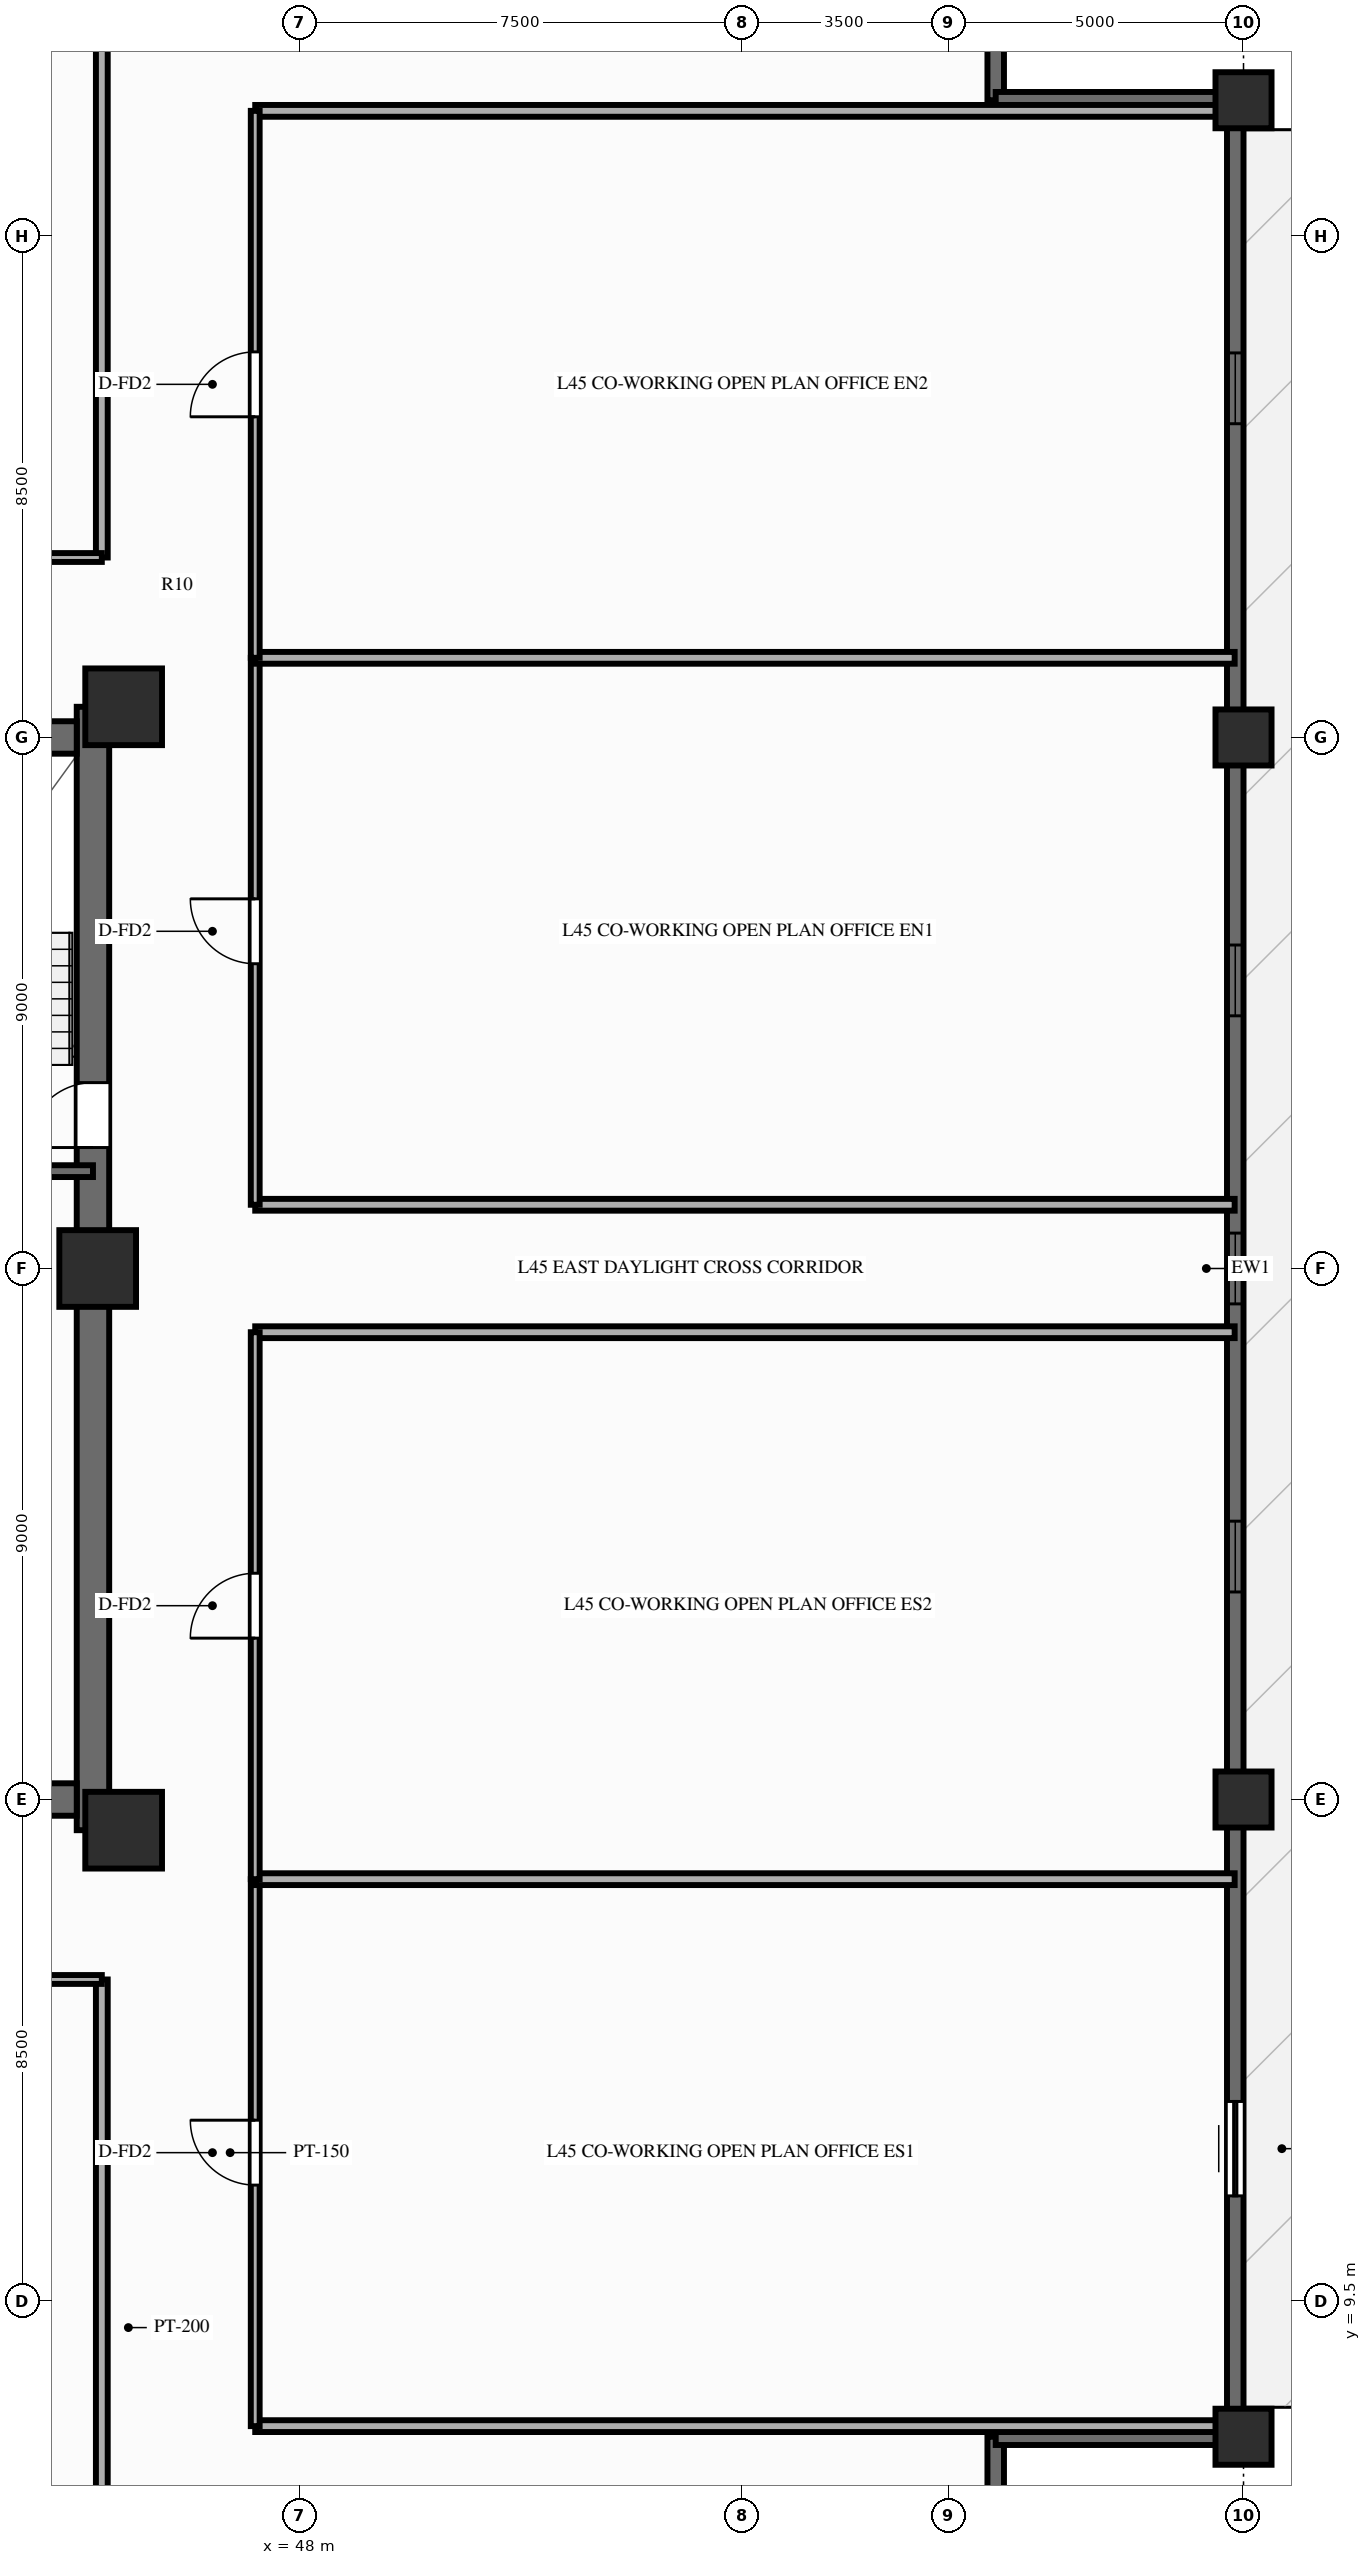
"""IFC4 building model, lengths in metres.
Left out: names, types, materials, properties, quantities, classifications, styles, units other than length and angle.
Written with IfcOpenShell. Run it as: python <this file> out.ifc"""

import sys

from ifc_helpers import new_model, si_unit, direction, frame, frame_2d, origin, origin_2d, place, context, subcontext, project, spatial, rectangle, extrude, source, transform, mapped, element, fill, save


model = new_model("IFC4")
c1 = context("Model", 3, precision=1e-05, world=origin(), true_north=direction((0.0, 1.0)))
c2 = subcontext(c1, "Body", "Model", "MODEL_VIEW")
j1 = project(units=[si_unit("LENGTHUNIT", "METRE"), si_unit("PLANEANGLEUNIT", "RADIAN")], contexts=[c1])
p1 = place(None, origin())
s1 = spatial("IfcSite", under=j1, at=p1, CompositionType="ELEMENT")
p2 = place(p1, origin())
s2 = spatial("IfcBuilding", under=s1, at=p2, CompositionType="ELEMENT")
p3 = place(p2, frame((0.0, 0.0, 141.75)))
s3 = spatial("IfcBuildingStorey", under=s2, at=p3, CompositionType="ELEMENT", Elevation=141.75)
p4 = place(p3, frame((44.5, 17.48, 0.0), z_axis=(0.0, 0.0, 1.0), x_axis=(0.0, 1.0, 0.0)))
e1 = element("IfcWall", 1, at=p4, inside=s3, PredefinedType="SHEAR", context=c2, shape_type="SweptSolid", body=[
    extrude(rectangle(XDim=19.04, YDim=0.55, at=frame_2d((9.52, 0.0))), origin(), (0.0, 0.0, 1.0), 3.0),
])
p5 = place(p4, frame((12.67, 0.0, 0.0), z_axis=(0.0, 0.0, 1.0), x_axis=(-1.0, 0.0, 0.0)))
e2 = element("IfcOpeningElement", 2, at=p5, cuts=e1, PredefinedType="OPENING", context=c2, shape_type="SweptSolid", body=[
    extrude(rectangle(XDim=1.1, YDim=2.15, at=frame_2d((0.55, 1.075))), frame((0.0, 0.287, 0.0), z_axis=(0.0, -1.0, 0.0), x_axis=(1.0, 0.0, 0.0)), (0.0, 0.0, 1.0), 0.574),
])
p6 = place(p3, frame((31.775, 18.0, 0.0), z_axis=(0.0, 0.0, 1.0), x_axis=(1.0, 0.0, 0.0)))
e3 = element("IfcWall", 3, at=p6, inside=s3, PredefinedType="SHEAR", context=c2, shape_type="SweptSolid", body=[
    extrude(rectangle(XDim=12.45, YDim=0.55, at=frame_2d((6.225, 0.0))), origin(), (0.0, 0.0, 1.0), 3.0),
])
p7 = place(p3, frame((31.775, 36.0, 0.0), z_axis=(0.0, 0.0, 1.0), x_axis=(1.0, 0.0, 0.0)))
e4 = element("IfcWall", 4, at=p7, inside=s3, PredefinedType="SHEAR", context=c2, shape_type="SweptSolid", body=[
    extrude(rectangle(XDim=12.45, YDim=0.55, at=frame_2d((6.225, 0.0))), origin(), (0.0, 0.0, 1.0), 3.0),
])
p8 = place(p7, frame((5.175, 0.0, 0.0), z_axis=(0.0, 0.0, 1.0), x_axis=(-1.0, 0.0, 0.0)))
e5 = element("IfcOpeningElement", 5, at=p8, cuts=e4, PredefinedType="OPENING", context=c2, shape_type="SweptSolid", body=[
    extrude(rectangle(XDim=1.4, YDim=2.15, at=frame_2d((0.7, 1.075))), frame((0.0, 0.287, 0.0), z_axis=(0.0, -1.0, 0.0), x_axis=(1.0, 0.0, 0.0)), (0.0, 0.0, 1.0), 0.574),
])
m1 = source(origin(), c2, "Body", "SweptSolid", [
    extrude(rectangle(XDim=1.3, YDim=1.3, at=origin_2d()), origin(), (0.0, 0.0, 1.0), 3.0),
])
for number, where, z_axis, x_axis in (
    (6, (45.02, 17.48, 0.0), (0.0, 0.0, 1.0), (1.0, 0.0, 0.0)),
    (7, (45.02, 36.52, 0.0), (0.0, 0.0, 1.0), (1.0, 0.0, 0.0)),
    (8, (44.58, 27.0, 0.0), (0.0, 0.0, 1.0), (1.0, 0.0, 0.0)),
):
    element("IfcColumn", number, at=place(p3, frame(where, z_axis=z_axis, x_axis=x_axis)), inside=s3, PredefinedType="COLUMN", context=c2, shape_type="MappedRepresentation", body=[
        mapped(m1, transform((0.0, 0.0, 0.0), scale=1.0)),
    ])
m2 = source(origin(), c2, "Body", "SweptSolid", [
    extrude(rectangle(XDim=0.95, YDim=0.95, at=origin_2d()), origin(), (0.0, 0.0, 1.0), 3.0),
])
for number, where, z_axis, x_axis in (
    (9, (64.0, 7.2, 0.0), (0.0, 0.0, 1.0), (1.0, 0.0, 0.0)),
    (10, (64.0, 18.0, 0.0), (0.0, 0.0, 1.0), (1.0, 0.0, 0.0)),
    (11, (64.0, 36.0, 0.0), (0.0, 0.0, 1.0), (1.0, 0.0, 0.0)),
    (12, (64.0, 46.8, 0.0), (0.0, 0.0, 1.0), (1.0, 0.0, 0.0)),
):
    element("IfcColumn", number, at=place(p3, frame(where, z_axis=z_axis, x_axis=x_axis)), inside=s3, PredefinedType="COLUMN", context=c2, shape_type="MappedRepresentation", body=[
        mapped(m2, transform((0.0, 0.0, 0.0), scale=1.0)),
    ])
p9 = place(p3, frame((63.86, 7.2, 0.0), z_axis=(0.0, 0.0, 1.0), x_axis=(0.0, 1.0, 0.0)))
e13 = element("IfcWall", 13, at=p9, inside=s3, PredefinedType="SOLIDWALL", context=c2, shape_type="SweptSolid", body=[
    extrude(rectangle(XDim=39.6, YDim=0.28, at=frame_2d((19.8, 0.0))), origin(), (0.0, 0.0, 1.0), 2.28),
])
p10 = place(p9, frame((5.683, 0.0, 0.0), z_axis=(0.0, 0.0, 1.0), x_axis=(-1.0, 0.0, 0.0)))
e14 = element("IfcOpeningElement", 14, at=p10, cuts=e13, PredefinedType="OPENING", context=c2, shape_type="SweptSolid", body=[
    extrude(rectangle(XDim=1.6, YDim=2.15, at=frame_2d((0.8, 1.075))), frame((0.0, 0.152, 0.0), z_axis=(0.0, -1.0, 0.0), x_axis=(1.0, 0.0, 0.0)), (0.0, 0.0, 1.0), 0.304),
])
p11 = place(p9, frame((14.317, 0.0, 0.25)))
e15 = element("IfcOpeningElement", 15, at=p11, cuts=e13, PredefinedType="OPENING", context=c2, shape_type="SweptSolid", body=[
    extrude(rectangle(XDim=1.2, YDim=1.5, at=frame_2d((0.6, 0.75))), frame((0.0, 0.152, 0.0), z_axis=(0.0, -1.0, 0.0), x_axis=(1.0, 0.0, 0.0)), (0.0, 0.0, 1.0), 0.304),
])
p12 = place(p9, frame((19.2, 0.0, 0.25)))
e16 = element("IfcOpeningElement", 16, at=p12, cuts=e13, PredefinedType="OPENING", context=c2, shape_type="SweptSolid", body=[
    extrude(rectangle(XDim=1.2, YDim=1.5, at=frame_2d((0.6, 0.75))), frame((0.0, 0.152, 0.0), z_axis=(0.0, -1.0, 0.0), x_axis=(1.0, 0.0, 0.0)), (0.0, 0.0, 1.0), 0.304),
])
p13 = place(p9, frame((24.083, 0.0, 0.25)))
e17 = element("IfcOpeningElement", 17, at=p13, cuts=e13, PredefinedType="OPENING", context=c2, shape_type="SweptSolid", body=[
    extrude(rectangle(XDim=1.2, YDim=1.5, at=frame_2d((0.6, 0.75))), frame((0.0, 0.152, 0.0), z_axis=(0.0, -1.0, 0.0), x_axis=(1.0, 0.0, 0.0)), (0.0, 0.0, 1.0), 0.304),
])
p14 = place(p9, frame((34.117, 0.0, 0.25)))
e18 = element("IfcOpeningElement", 18, at=p14, cuts=e13, PredefinedType="OPENING", context=c2, shape_type="SweptSolid", body=[
    extrude(rectangle(XDim=1.2, YDim=1.5, at=frame_2d((0.6, 0.75))), frame((0.0, 0.152, 0.0), z_axis=(0.0, -1.0, 0.0), x_axis=(1.0, 0.0, 0.0)), (0.0, 0.0, 1.0), 0.304),
])
for number, where, z_axis, x_axis in (
    (19, (59.8, 3.08, 0.0), (0.0, 0.0, 1.0), (0.0, 1.0, 0.0)),
    (20, (59.8, 7.2, 0.0), (0.0, 0.0, 1.0), (1.0, 0.0, 0.0)),
    (21, (59.8, 46.8, 0.0), (0.0, 0.0, 1.0), (0.0, 1.0, 0.0)),
    (22, (59.8, 46.8, 0.0), (0.0, 0.0, 1.0), (1.0, 0.0, 0.0)),
):
    element("IfcWall", number, at=place(p3, frame(where, z_axis=z_axis, x_axis=x_axis)), inside=s3, PredefinedType="SOLIDWALL", context=c2, shape_type="SweptSolid", body=[
        extrude(rectangle(XDim=4.12, YDim=0.28, at=frame_2d((2.06, 0.0))), origin(), (0.0, 0.0, 1.0), 2.28),
    ])
p15 = place(p3, frame((40.57, 28.65, 0.0), z_axis=(0.0, 0.0, 1.0), x_axis=(1.0, 0.0, 0.0)))
e23 = element("IfcWall", 23, at=p15, inside=s3, PredefinedType="SOLIDWALL", context=c2, shape_type="SweptSolid", body=[
    extrude(rectangle(XDim=3.93, YDim=0.2, at=frame_2d((1.965, 0.0))), origin(), (0.0, 0.0, 1.0), 2.7),
])
p16 = place(p3, frame((44.65, 14.95, 0.0), z_axis=(0.0, 0.0, 1.0), x_axis=(0.0, -1.0, 0.0)))
e24 = element("IfcWall", 24, at=p16, inside=s3, PredefinedType="PARTITIONING", context=c2, shape_type="SweptSolid", body=[
    extrude(rectangle(XDim=11.8, YDim=0.2, at=frame_2d((5.9, 0.0))), origin(), (0.0, 0.0, 1.0), 2.34),
])
p17 = place(p3, frame((36.25, 14.95, 0.0), z_axis=(0.0, 0.0, 1.0), x_axis=(1.0, 0.0, 0.0)))
e25 = element("IfcWall", 25, at=p17, inside=s3, PredefinedType="PARTITIONING", context=c2, shape_type="SweptSolid", body=[
    extrude(rectangle(XDim=8.4, YDim=0.15, at=frame_2d((4.2, 0.0))), origin(), (0.0, 0.0, 1.0), 2.7),
])
p18 = place(p17, frame((3.367, 0.0, 0.0)))
e26 = element("IfcOpeningElement", 26, at=p18, cuts=e25, PredefinedType="OPENING", context=c2, shape_type="SweptSolid", body=[
    extrude(rectangle(XDim=1.1, YDim=2.15, at=frame_2d((0.55, 1.075))), frame((0.0, 0.087, 0.0), z_axis=(0.0, -1.0, 0.0), x_axis=(1.0, 0.0, 0.0)), (0.0, 0.0, 1.0), 0.174),
])
p19 = place(p3, frame((44.65, 39.05, 0.0), z_axis=(0.0, 0.0, 1.0), x_axis=(0.0, 1.0, 0.0)))
e27 = element("IfcWall", 27, at=p19, inside=s3, PredefinedType="PARTITIONING", context=c2, shape_type="SweptSolid", body=[
    extrude(rectangle(XDim=11.8, YDim=0.2, at=frame_2d((5.9, 0.0))), origin(), (0.0, 0.0, 1.0), 2.34),
])
p20 = place(p3, frame((38.629, 39.05, 0.0), z_axis=(0.0, 0.0, 1.0), x_axis=(1.0, 0.0, 0.0)))
e28 = element("IfcWall", 28, at=p20, inside=s3, PredefinedType="PARTITIONING", context=c2, shape_type="SweptSolid", body=[
    extrude(rectangle(XDim=6.021, YDim=0.15, at=frame_2d((3.01, 0.0))), origin(), (0.0, 0.0, 1.0), 2.7),
])
p21 = place(p20, frame((2.46, 0.0, 0.0)))
e29 = element("IfcOpeningElement", 29, at=p21, cuts=e28, PredefinedType="OPENING", context=c2, shape_type="SweptSolid", body=[
    extrude(rectangle(XDim=1.1, YDim=2.15, at=frame_2d((0.55, 1.075))), frame((0.0, 0.087, 0.0), z_axis=(0.0, -1.0, 0.0), x_axis=(1.0, 0.0, 0.0)), (0.0, 0.0, 1.0), 0.174),
])
for number, where, z_axis, x_axis in (
    (30, (47.25, 7.38, 0.0), (0.0, 0.0, 1.0), (1.0, 0.0, 0.0)),
    (31, (47.25, 25.92, 0.0), (0.0, 0.0, 1.0), (1.0, 0.0, 0.0)),
):
    element("IfcWall", number, at=place(p3, frame(where, z_axis=z_axis, x_axis=x_axis)), inside=s3, PredefinedType="PARTITIONING", context=c2, shape_type="SweptSolid", body=[
        extrude(rectangle(XDim=16.6, YDim=0.2, at=frame_2d((8.3, 0.0))), origin(), (0.0, 0.0, 1.0), 2.7),
    ])
p22 = place(p3, frame((47.25, 7.38, 0.0), z_axis=(0.0, 0.0, 1.0), x_axis=(0.0, 1.0, 0.0)))
e32 = element("IfcWall", 32, at=p22, inside=s3, PredefinedType="PARTITIONING", context=c2, shape_type="SweptSolid", body=[
    extrude(rectangle(XDim=9.27, YDim=0.15, at=frame_2d((4.635, 0.0))), origin(), (0.0, 0.0, 1.0), 2.7),
])
p23 = place(p22, frame((4.085, 0.0, 0.0)))
e33 = element("IfcOpeningElement", 33, at=p23, cuts=e32, PredefinedType="OPENING", context=c2, shape_type="SweptSolid", body=[
    extrude(rectangle(XDim=1.1, YDim=2.15, at=frame_2d((0.55, 1.075))), frame((0.0, 0.087, 0.0), z_axis=(0.0, -1.0, 0.0), x_axis=(1.0, 0.0, 0.0)), (0.0, 0.0, 1.0), 0.174),
])
p24 = place(p3, frame((47.25, 16.65, 0.0), z_axis=(0.0, 0.0, 1.0), x_axis=(1.0, 0.0, 0.0)))
e34 = element("IfcWall", 34, at=p24, inside=s3, PredefinedType="PARTITIONING", context=c2, shape_type="SweptSolid", body=[
    extrude(rectangle(XDim=16.6, YDim=0.2, at=frame_2d((8.3, 0.0))), origin(), (0.0, 0.0, 1.0), 2.7),
])
p25 = place(p3, frame((47.25, 16.65, 0.0), z_axis=(0.0, 0.0, 1.0), x_axis=(0.0, 1.0, 0.0)))
e35 = element("IfcWall", 35, at=p25, inside=s3, PredefinedType="PARTITIONING", context=c2, shape_type="SweptSolid", body=[
    extrude(rectangle(XDim=9.27, YDim=0.15, at=frame_2d((4.635, 0.0))), origin(), (0.0, 0.0, 1.0), 2.7),
])
p26 = place(p25, frame((4.085, 0.0, 0.0)))
e36 = element("IfcOpeningElement", 36, at=p26, cuts=e35, PredefinedType="OPENING", context=c2, shape_type="SweptSolid", body=[
    extrude(rectangle(XDim=1.1, YDim=2.15, at=frame_2d((0.55, 1.075))), frame((0.0, 0.087, 0.0), z_axis=(0.0, -1.0, 0.0), x_axis=(1.0, 0.0, 0.0)), (0.0, 0.0, 1.0), 0.174),
])
for number, where, z_axis, x_axis in (
    (37, (47.25, 28.08, 0.0), (0.0, 0.0, 1.0), (1.0, 0.0, 0.0)),
    (38, (47.25, 46.62, 0.0), (0.0, 0.0, 1.0), (1.0, 0.0, 0.0)),
):
    element("IfcWall", number, at=place(p3, frame(where, z_axis=z_axis, x_axis=x_axis)), inside=s3, PredefinedType="PARTITIONING", context=c2, shape_type="SweptSolid", body=[
        extrude(rectangle(XDim=16.6, YDim=0.2, at=frame_2d((8.3, 0.0))), origin(), (0.0, 0.0, 1.0), 2.7),
    ])
p27 = place(p3, frame((47.25, 28.08, 0.0), z_axis=(0.0, 0.0, 1.0), x_axis=(0.0, 1.0, 0.0)))
e39 = element("IfcWall", 39, at=p27, inside=s3, PredefinedType="PARTITIONING", context=c2, shape_type="SweptSolid", body=[
    extrude(rectangle(XDim=9.27, YDim=0.15, at=frame_2d((4.635, 0.0))), origin(), (0.0, 0.0, 1.0), 2.7),
])
p28 = place(p27, frame((4.085, 0.0, 0.0)))
e40 = element("IfcOpeningElement", 40, at=p28, cuts=e39, PredefinedType="OPENING", context=c2, shape_type="SweptSolid", body=[
    extrude(rectangle(XDim=1.1, YDim=2.15, at=frame_2d((0.55, 1.075))), frame((0.0, 0.087, 0.0), z_axis=(0.0, -1.0, 0.0), x_axis=(1.0, 0.0, 0.0)), (0.0, 0.0, 1.0), 0.174),
])
p29 = place(p3, frame((47.25, 37.35, 0.0), z_axis=(0.0, 0.0, 1.0), x_axis=(1.0, 0.0, 0.0)))
e41 = element("IfcWall", 41, at=p29, inside=s3, PredefinedType="PARTITIONING", context=c2, shape_type="SweptSolid", body=[
    extrude(rectangle(XDim=16.6, YDim=0.2, at=frame_2d((8.3, 0.0))), origin(), (0.0, 0.0, 1.0), 2.7),
])
p30 = place(p3, frame((47.25, 37.35, 0.0), z_axis=(0.0, 0.0, 1.0), x_axis=(0.0, 1.0, 0.0)))
e42 = element("IfcWall", 42, at=p30, inside=s3, PredefinedType="PARTITIONING", context=c2, shape_type="SweptSolid", body=[
    extrude(rectangle(XDim=9.27, YDim=0.15, at=frame_2d((4.635, 0.0))), origin(), (0.0, 0.0, 1.0), 2.7),
])
p31 = place(p30, frame((4.085, 0.0, 0.0)))
e43 = element("IfcOpeningElement", 43, at=p31, cuts=e42, PredefinedType="OPENING", context=c2, shape_type="SweptSolid", body=[
    extrude(rectangle(XDim=1.1, YDim=2.15, at=frame_2d((0.55, 1.075))), frame((0.0, 0.087, 0.0), z_axis=(0.0, -1.0, 0.0), x_axis=(1.0, 0.0, 0.0)), (0.0, 0.0, 1.0), 0.174),
])
m3 = source(origin(), c2, "Body", "SweptSolid", [
    extrude(rectangle(XDim=1.6, YDim=2.15, at=frame_2d((0.8, 1.075))), frame((0.0, 0.025, 0.0), z_axis=(0.0, -1.0, 0.0), x_axis=(1.0, 0.0, 0.0)), (0.0, 0.0, 1.0), 0.05),
])
p32 = place(p10, origin())
e44 = element("IfcDoor", 44, at=p32, inside=s3, OperationType="SLIDING_TO_LEFT", PredefinedType="DOOR", context=c2, shape_type="MappedRepresentation", body=[
    mapped(m3, transform((0.0, 0.0, 0.0), scale=1.0)),
])
fill(e14, e44)
m4 = source(origin(), c2, "Body", "SweptSolid", [
    extrude(rectangle(XDim=1.2, YDim=1.5, at=frame_2d((0.6, 0.75))), frame((0.0, 0.03, 0.0), z_axis=(0.0, -1.0, 0.0), x_axis=(1.0, 0.0, 0.0)), (0.0, 0.0, 1.0), 0.06),
])
p33 = place(p11, origin())
e45 = element("IfcWindow", 45, at=p33, inside=s3, PartitioningType="SINGLE_PANEL", PredefinedType="WINDOW", context=c2, shape_type="MappedRepresentation", body=[
    mapped(m4, transform((0.0, 0.0, 0.0), scale=1.0)),
])
fill(e15, e45)
p34 = place(p12, origin())
e46 = element("IfcWindow", 46, at=p34, inside=s3, PartitioningType="SINGLE_PANEL", PredefinedType="WINDOW", context=c2, shape_type="MappedRepresentation", body=[
    mapped(m4, transform((0.0, 0.0, 0.0), scale=1.0)),
])
fill(e16, e46)
p35 = place(p13, origin())
e47 = element("IfcWindow", 47, at=p35, inside=s3, PartitioningType="SINGLE_PANEL", PredefinedType="WINDOW", context=c2, shape_type="MappedRepresentation", body=[
    mapped(m4, transform((0.0, 0.0, 0.0), scale=1.0)),
])
fill(e17, e47)
p36 = place(p14, origin())
e48 = element("IfcWindow", 48, at=p36, inside=s3, PartitioningType="SINGLE_PANEL", PredefinedType="WINDOW", context=c2, shape_type="MappedRepresentation", body=[
    mapped(m4, transform((0.0, 0.0, 0.0), scale=1.0)),
])
fill(e18, e48)
m5 = source(origin(), c2, "Body", "SweptSolid", [
    extrude(rectangle(XDim=1.1, YDim=2.15, at=frame_2d((0.55, 1.075))), frame((0.0, 0.025, 0.0), z_axis=(0.0, -1.0, 0.0), x_axis=(1.0, 0.0, 0.0)), (0.0, 0.0, 1.0), 0.05),
])
p37 = place(p5, origin())
e49 = element("IfcDoor", 49, at=p37, inside=s3, OperationType="SINGLE_SWING_RIGHT", PredefinedType="DOOR", context=c2, shape_type="MappedRepresentation", body=[
    mapped(m5, transform((0.0, 0.0, 0.0), scale=1.0)),
])
fill(e2, e49)
p38 = place(p23, origin())
e50 = element("IfcDoor", 50, at=p38, inside=s3, OperationType="SINGLE_SWING_RIGHT", PredefinedType="DOOR", context=c2, shape_type="MappedRepresentation", body=[
    mapped(m5, transform((0.0, 0.0, 0.0), scale=1.0)),
])
fill(e33, e50)
p39 = place(p26, origin())
e51 = element("IfcDoor", 51, at=p39, inside=s3, OperationType="SINGLE_SWING_LEFT", PredefinedType="DOOR", context=c2, shape_type="MappedRepresentation", body=[
    mapped(m5, transform((0.0, 0.0, 0.0), scale=1.0)),
])
fill(e36, e51)
p40 = place(p28, origin())
e52 = element("IfcDoor", 52, at=p40, inside=s3, OperationType="SINGLE_SWING_RIGHT", PredefinedType="DOOR", context=c2, shape_type="MappedRepresentation", body=[
    mapped(m5, transform((0.0, 0.0, 0.0), scale=1.0)),
])
fill(e40, e52)
p41 = place(p31, origin())
e53 = element("IfcDoor", 53, at=p41, inside=s3, OperationType="SINGLE_SWING_LEFT", PredefinedType="DOOR", context=c2, shape_type="MappedRepresentation", body=[
    mapped(m5, transform((0.0, 0.0, 0.0), scale=1.0)),
])
fill(e43, e53)
save(model, sys.argv[1])
